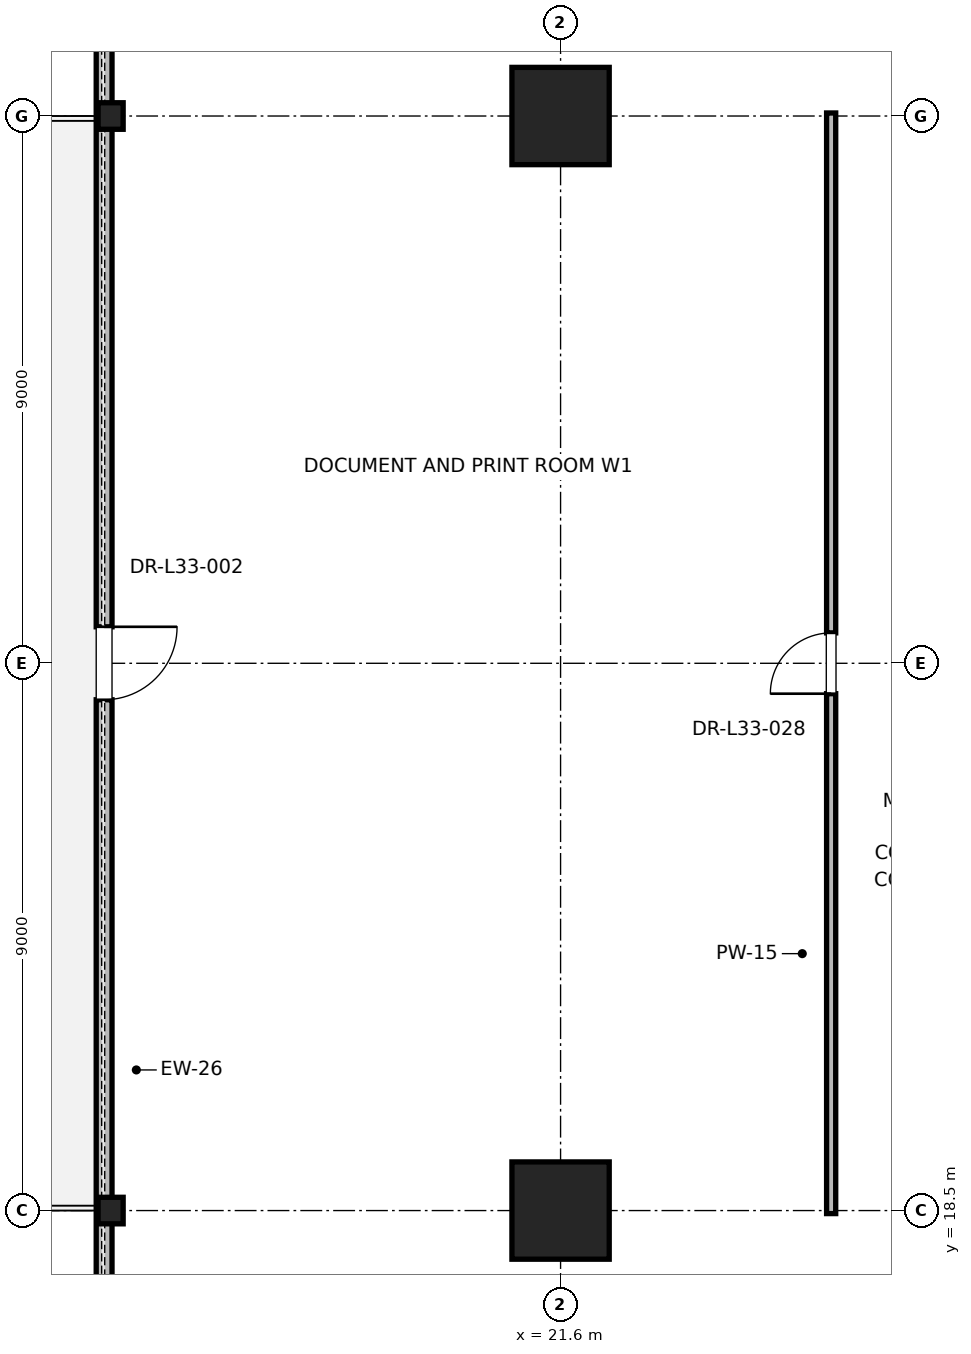
"""IFC4 building model, lengths in metres.
Left out: names, types, materials, properties, quantities, classifications, styles, units other than length and angle.
Written with IfcOpenShell. Run it as: python <this file> out.ifc"""

import sys

from ifc_helpers import new_model, si_unit, direction, frame, frame_2d, origin, origin_2d, place, context, subcontext, project, spatial, rectangle, i_section, extrude, element, fill, save


model = new_model("IFC4")
c1 = context("Model", 3, precision=1e-05, world=origin(), true_north=direction((0.0, 1.0)))
c2 = subcontext(c1, "Body", "Model", "MODEL_VIEW")
j1 = project(units=[si_unit("LENGTHUNIT", "METRE"), si_unit("PLANEANGLEUNIT", "RADIAN")], contexts=[c1])
p1 = place(None, origin())
s1 = spatial("IfcSite", under=j1, at=p1, CompositionType="ELEMENT")
p2 = place(p1, origin())
s2 = spatial("IfcBuilding", under=s1, at=p2, CompositionType="ELEMENT")
p3 = place(p2, frame((0.0, 0.0, 144.4)))
s3 = spatial("IfcBuildingStorey", under=s2, at=p3, CompositionType="ELEMENT", Elevation=144.4)
for number, where, z_axis, x_axis in (
    (1, (21.6, 18.5, 0.0), (0.0, 0.0, 1.0), (1.0, 0.0, 0.0)),
    (2, (21.6, 36.5, 0.0), (0.0, 0.0, 1.0), (1.0, 0.0, 0.0)),
):
    element("IfcColumn", number, at=place(p3, frame(where, z_axis=z_axis, x_axis=x_axis)), inside=s3, PredefinedType="COLUMN", context=c2, shape_type="SweptSolid", body=[
        extrude(rectangle(XDim=1.6, YDim=1.6, at=origin_2d()), origin(), (0.0, 0.0, 1.0), 4.0),
    ])
for number, where, z_axis, x_axis in (
    (3, (14.2, 18.5, 0.0), (0.0, 0.0, 1.0), (1.0, 0.0, 0.0)),
    (4, (14.2, 36.5, 0.0), (0.0, 0.0, 1.0), (1.0, 0.0, 0.0)),
):
    element("IfcColumn", number, at=place(p3, frame(where, z_axis=z_axis, x_axis=x_axis)), inside=s3, PredefinedType="COLUMN", context=c2, shape_type="SweptSolid", body=[
        extrude(i_section(OverallWidth=0.412, OverallDepth=0.437, WebThickness=0.036, FlangeThickness=0.058, FilletRadius=0.015, at=origin_2d()), origin(), (0.0, 0.0, 1.0), 4.0),
    ])
p4 = place(p3, frame((14.093, 46.475, 0.0), z_axis=(0.0, 0.0, 1.0), x_axis=(0.0, -1.0, 0.0)))
e5 = element("IfcWall", 5, at=p4, inside=s3, PredefinedType="PARAPET", context=c2, shape_type="SweptSolid", body=[
    extrude(rectangle(XDim=37.95, YDim=0.26, at=frame_2d((18.975, 0.0))), origin(), (0.0, 0.0, 1.0), 2.97),
])
p5 = place(p4, frame((4.2, 0.0, 0.85)))
e6 = element("IfcOpeningElement", 6, at=p5, cuts=e5, PredefinedType="OPENING", context=c2, shape_type="SweptSolid", body=[
    extrude(rectangle(XDim=2.0, YDim=2.3, at=frame_2d((1.0, 1.15))), frame((0.0, 0.13, 0.0), z_axis=(0.0, -1.0, 0.0), x_axis=(1.0, 0.0, 0.0)), (0.0, 0.0, 1.0), 0.26),
])
p6 = place(p4, frame((18.375, 0.0, 0.0)))
e7 = element("IfcOpeningElement", 7, at=p6, cuts=e5, PredefinedType="OPENING", context=c2, shape_type="SweptSolid", body=[
    extrude(rectangle(XDim=1.2, YDim=2.2, at=frame_2d((0.6, 1.1))), frame((0.0, 0.13, 0.0), z_axis=(0.0, -1.0, 0.0), x_axis=(1.0, 0.0, 0.0)), (0.0, 0.0, 1.0), 0.26),
])
p7 = place(p4, frame((31.75, 0.0, 0.85)))
e8 = element("IfcOpeningElement", 8, at=p7, cuts=e5, PredefinedType="OPENING", context=c2, shape_type="SweptSolid", body=[
    extrude(rectangle(XDim=2.0, YDim=2.3, at=frame_2d((1.0, 1.15))), frame((0.0, 0.13, 0.0), z_axis=(0.0, -1.0, 0.0), x_axis=(1.0, 0.0, 0.0)), (0.0, 0.0, 1.0), 0.26),
])
p8 = place(p3, frame((26.05, 18.45, 0.0), z_axis=(0.0, 0.0, 1.0), x_axis=(0.0, 1.0, 0.0)))
e9 = element("IfcWall", 9, at=p8, inside=s3, PredefinedType="PARTITIONING", context=c2, shape_type="SweptSolid", body=[
    extrude(rectangle(XDim=18.1, YDim=0.15, at=frame_2d((9.05, 0.0))), origin(), (0.0, 0.0, 1.0), 2.85),
])
p9 = place(p8, frame((8.55, 0.0, 0.0)))
e10 = element("IfcOpeningElement", 10, at=p9, cuts=e9, PredefinedType="OPENING", context=c2, shape_type="SweptSolid", body=[
    extrude(rectangle(XDim=1.0, YDim=2.15, at=frame_2d((0.5, 1.075))), frame((0.0, 0.075, 0.0), z_axis=(0.0, -1.0, 0.0), x_axis=(1.0, 0.0, 0.0)), (0.0, 0.0, 1.0), 0.15),
])
p10 = place(p6, origin())
e11 = element("IfcDoor", 11, at=p10, inside=s3, OperationType="SINGLE_SWING_LEFT", PredefinedType="DOOR", context=c2, shape_type="SweptSolid", body=[
    extrude(rectangle(XDim=1.2, YDim=2.2, at=frame_2d((0.6, 1.1))), frame((0.0, 0.025, 0.0), z_axis=(0.0, -1.0, 0.0), x_axis=(1.0, 0.0, 0.0)), (0.0, 0.0, 1.0), 0.05),
])
fill(e7, e11)
p11 = place(p9, origin())
e12 = element("IfcDoor", 12, at=p11, inside=s3, OperationType="SINGLE_SWING_LEFT", PredefinedType="DOOR", context=c2, shape_type="SweptSolid", body=[
    extrude(rectangle(XDim=1.0, YDim=2.15, at=frame_2d((0.5, 1.075))), frame((0.0, 0.025, 0.0), z_axis=(0.0, -1.0, 0.0), x_axis=(1.0, 0.0, 0.0)), (0.0, 0.0, 1.0), 0.05),
])
fill(e10, e12)
save(model, sys.argv[1])
